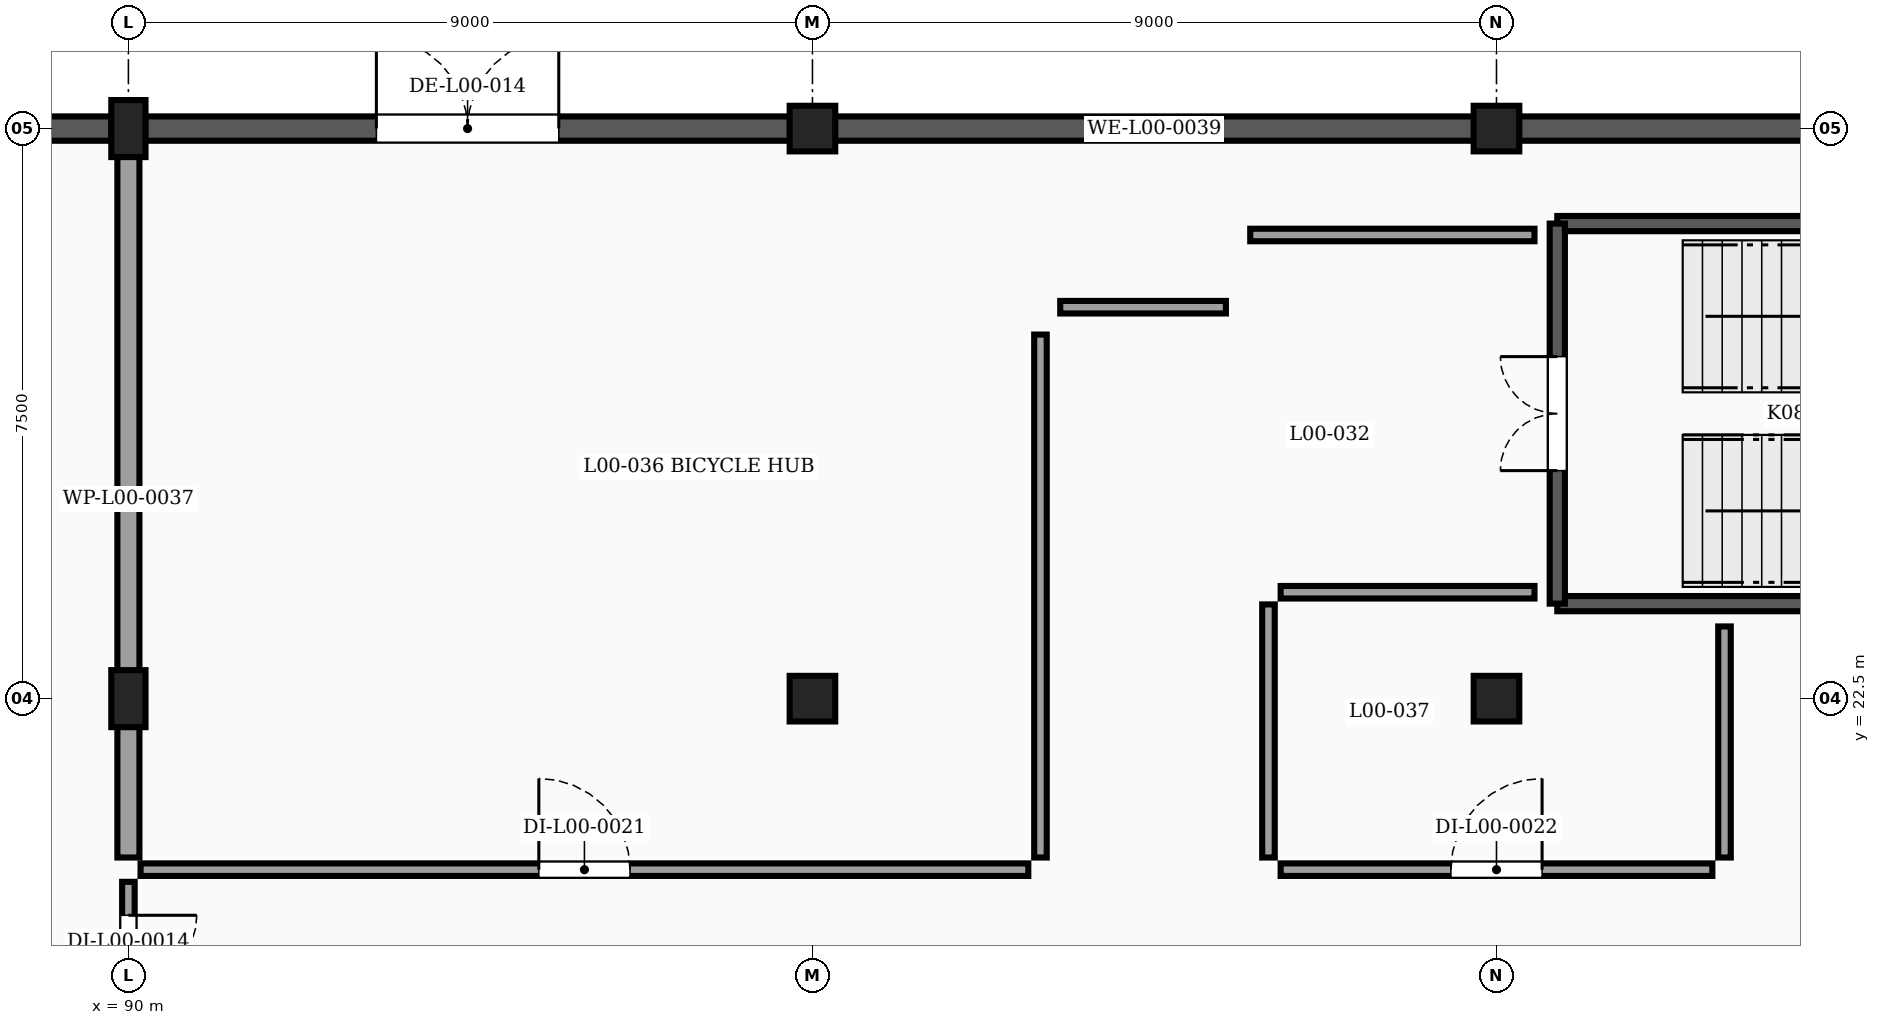
"""IFC4 building model, lengths in metres.
Left out: names, types, materials, properties, quantities, classifications, styles, units other than length and angle.
Written with IfcOpenShell. Run it as: python <this file> out.ifc"""

import sys

from ifc_helpers import new_model, si_unit, direction, frame, frame_2d, origin, origin_2d, place, context, subcontext, project, spatial, rectangle, extrude, element, fill, save


model = new_model("IFC4")
c1 = context("Model", 3, precision=1e-05, world=origin(), true_north=direction((0.0, 1.0)))
c2 = subcontext(c1, "Body", "Model", "MODEL_VIEW")
j1 = project(units=[si_unit("LENGTHUNIT", "METRE"), si_unit("PLANEANGLEUNIT", "RADIAN")], contexts=[c1])
p1 = place(None, origin())
s1 = spatial("IfcSite", under=j1, at=p1, CompositionType="ELEMENT")
p2 = place(p1, origin())
s2 = spatial("IfcBuilding", under=s1, at=p2, CompositionType="ELEMENT")
p3 = place(p2, origin())
s3 = spatial("IfcBuildingStorey", under=s2, at=p3, CompositionType="ELEMENT", Elevation=0.0)
p4 = place(p3, frame((90.0, 22.5, -0.25), z_axis=(0.0, 0.0, 1.0), x_axis=(1.0, 0.0, 0.0)))
e1 = element("IfcColumn", 1, at=p4, inside=s3, PredefinedType="COLUMN", context=c2, shape_type="SweptSolid", body=[
    extrude(rectangle(XDim=0.45, YDim=0.75, at=origin_2d()), origin(), (0.0, 0.0, 1.0), 4.75),
])
for number, where, z_axis, x_axis in (
    (2, (99.0, 22.5, -0.25), (0.0, 0.0, 1.0), (1.0, 0.0, 0.0)),
    (3, (108.0, 22.5, -0.25), (0.0, 0.0, 1.0), (1.0, 0.0, 0.0)),
):
    element("IfcColumn", number, at=place(p3, frame(where, z_axis=z_axis, x_axis=x_axis)), inside=s3, PredefinedType="COLUMN", context=c2, shape_type="SweptSolid", body=[
        extrude(rectangle(XDim=0.6, YDim=0.6, at=origin_2d()), origin(), (0.0, 0.0, 1.0), 4.75),
    ])
p5 = place(p3, frame((90.0, 30.0, -0.25), z_axis=(0.0, 0.0, 1.0), x_axis=(1.0, 0.0, 0.0)))
e4 = element("IfcColumn", 4, at=p5, inside=s3, PredefinedType="COLUMN", context=c2, shape_type="SweptSolid", body=[
    extrude(rectangle(XDim=0.45, YDim=0.75, at=origin_2d()), origin(), (0.0, 0.0, 1.0), 4.75),
])
for number, where, z_axis, x_axis in (
    (5, (99.0, 30.0, -0.25), (0.0, 0.0, 1.0), (1.0, 0.0, 0.0)),
    (6, (108.0, 30.0, -0.25), (0.0, 0.0, 1.0), (1.0, 0.0, 0.0)),
):
    element("IfcColumn", number, at=place(p3, frame(where, z_axis=z_axis, x_axis=x_axis)), inside=s3, PredefinedType="COLUMN", context=c2, shape_type="SweptSolid", body=[
        extrude(rectangle(XDim=0.6, YDim=0.6, at=origin_2d()), origin(), (0.0, 0.0, 1.0), 4.75),
    ])
p6 = place(p3, frame((81.296, 30.0, 0.0), z_axis=(0.0, 0.0, 1.0), x_axis=(1.0, 0.0, 0.0)))
e7 = element("IfcWall", 7, at=p6, inside=s3, PredefinedType="SOLIDWALL", context=c2, shape_type="SweptSolid", body=[
    extrude(rectangle(XDim=8.483, YDim=0.32, at=frame_2d((4.242, 0.0))), origin(), (0.0, 0.0, 1.0), 4.1),
])
p7 = place(p6, frame((3.001, 0.0, 0.95)))
e8 = element("IfcOpeningElement", 8, at=p7, cuts=e7, PredefinedType="OPENING", context=c2, shape_type="SweptSolid", body=[
    extrude(rectangle(XDim=2.48, YDim=1.62, at=frame_2d((1.24, 0.81))), frame((0.0, 0.17, 0.0), z_axis=(0.0, -1.0, 0.0), x_axis=(1.0, 0.0, 0.0)), (0.0, 0.0, 1.0), 0.34),
])
p8 = place(p3, frame((90.221, 30.0, 0.0), z_axis=(0.0, 0.0, 1.0), x_axis=(1.0, 0.0, 0.0)))
e9 = element("IfcWall", 9, at=p8, inside=s3, PredefinedType="SOLIDWALL", context=c2, shape_type="SweptSolid", body=[
    extrude(rectangle(XDim=8.483, YDim=0.32, at=frame_2d((4.242, 0.0))), origin(), (0.0, 0.0, 1.0), 3.442),
])
p9 = place(p8, frame((3.042, 0.0, 0.0)))
e10 = element("IfcOpeningElement", 10, at=p9, cuts=e9, PredefinedType="OPENING", context=c2, shape_type="SweptSolid", body=[
    extrude(rectangle(XDim=2.4, YDim=2.25, at=frame_2d((1.2, 1.125))), frame((0.0, 0.17, 0.0), z_axis=(0.0, -1.0, 0.0), x_axis=(1.0, 0.0, 0.0)), (0.0, 0.0, 1.0), 0.34),
])
for number, where, z_axis, x_axis in (
    (11, (99.296, 30.0, 0.0), (0.0, 0.0, 1.0), (1.0, 0.0, 0.0)),
    (12, (108.296, 30.0, 0.0), (0.0, 0.0, 1.0), (1.0, 0.0, 0.0)),
):
    element("IfcWall", number, at=place(p3, frame(where, z_axis=z_axis, x_axis=x_axis)), inside=s3, PredefinedType="SOLIDWALL", context=c2, shape_type="SweptSolid", body=[
        extrude(rectangle(XDim=8.408, YDim=0.32, at=frame_2d((4.204, 0.0))), origin(), (0.0, 0.0, 1.0), 3.442),
    ])
for number, where, z_axis, x_axis in (
    (13, (108.8, 23.75, 0.0), (0.0, 0.0, 1.0), (1.0, 0.0, 0.0)),
    (14, (116.2, 28.75, 0.0), (0.0, 0.0, 1.0), (-1.0, 0.0, 0.0)),
):
    element("IfcWall", number, at=place(p3, frame(where, z_axis=z_axis, x_axis=x_axis)), inside=s3, PredefinedType="SHEAR", context=c2, shape_type="SweptSolid", body=[
        extrude(rectangle(XDim=7.4, YDim=0.2, at=frame_2d((3.7, 0.0))), origin(), (0.0, 0.0, 1.0), 4.1),
    ])
p10 = place(p3, frame((108.8, 23.75, 0.0), z_axis=(0.0, 0.0, 1.0), x_axis=(0.0, 1.0, 0.0)))
e15 = element("IfcWall", 15, at=p10, inside=s3, PredefinedType="SHEAR", context=c2, shape_type="SweptSolid", body=[
    extrude(rectangle(XDim=5.0, YDim=0.2, at=frame_2d((2.5, 0.0))), origin(), (0.0, 0.0, 1.0), 4.1),
])
p11 = place(p10, frame((1.75, 0.0, 0.0)))
e16 = element("IfcOpeningElement", 16, at=p11, cuts=e15, PredefinedType="OPENING", context=c2, shape_type="SweptSolid", body=[
    extrude(rectangle(XDim=1.5, YDim=2.15, at=frame_2d((0.75, 1.075))), frame((0.0, 0.11, 0.0), z_axis=(0.0, -1.0, 0.0), x_axis=(1.0, 0.0, 0.0)), (0.0, 0.0, 1.0), 0.22),
])
p12 = place(p3, frame((90.0, 20.09, 0.0), z_axis=(0.0, 0.0, 1.0), x_axis=(0.0, -1.0, 0.0)))
e17 = element("IfcWall", 17, at=p12, inside=s3, PredefinedType="PARTITIONING", context=c2, shape_type="SweptSolid", body=[
    extrude(rectangle(XDim=2.68, YDim=0.165, at=frame_2d((1.34, 0.0))), origin(), (0.0, 0.0, 1.0), 3.442),
])
p13 = place(p12, frame((0.44, 0.0, 0.0)))
e18 = element("IfcOpeningElement", 18, at=p13, cuts=e17, PredefinedType="OPENING", context=c2, shape_type="SweptSolid", body=[
    extrude(rectangle(XDim=1.8, YDim=2.25, at=frame_2d((0.9, 1.125))), frame((0.0, 0.093, 0.0), z_axis=(0.0, -1.0, 0.0), x_axis=(1.0, 0.0, 0.0)), (0.0, 0.0, 1.0), 0.185),
])
p14 = place(p3, frame((90.0, 29.84, 0.0), z_axis=(0.0, 0.0, 1.0), x_axis=(0.0, -1.0, 0.0)))
e19 = element("IfcWall", 19, at=p14, inside=s3, PredefinedType="PARTITIONING", context=c2, shape_type="SweptSolid", body=[
    extrude(rectangle(XDim=9.43, YDim=0.29, at=frame_2d((4.715, 0.0))), origin(), (0.0, 0.0, 1.0), 3.442),
])
p15 = place(p3, frame((90.16, 20.25, 0.0), z_axis=(0.0, 0.0, 1.0), x_axis=(1.0, 0.0, 0.0)))
e20 = element("IfcWall", 20, at=p15, inside=s3, PredefinedType="PARTITIONING", context=c2, shape_type="SweptSolid", body=[
    extrude(rectangle(XDim=11.68, YDim=0.165, at=frame_2d((5.84, 0.0))), origin(), (0.0, 0.0, 1.0), 4.1),
])
p16 = place(p15, frame((5.24, 0.0, 0.0)))
e21 = element("IfcOpeningElement", 21, at=p16, cuts=e20, PredefinedType="OPENING", context=c2, shape_type="SweptSolid", body=[
    extrude(rectangle(XDim=1.2, YDim=2.15, at=frame_2d((0.6, 1.075))), frame((0.0, 0.093, 0.0), z_axis=(0.0, -1.0, 0.0), x_axis=(1.0, 0.0, 0.0)), (0.0, 0.0, 1.0), 0.185),
])
p17 = place(p3, frame((102.0, 20.41, 0.0), z_axis=(0.0, 0.0, 1.0), x_axis=(0.0, 1.0, 0.0)))
e22 = element("IfcWall", 22, at=p17, inside=s3, PredefinedType="PARTITIONING", context=c2, shape_type="SweptSolid", body=[
    extrude(rectangle(XDim=6.88, YDim=0.165, at=frame_2d((3.44, 0.0))), origin(), (0.0, 0.0, 1.0), 3.788),
])
p18 = place(p3, frame((102.26, 27.65, 0.0), z_axis=(0.0, 0.0, 1.0), x_axis=(1.0, 0.0, 0.0)))
e23 = element("IfcWall", 23, at=p18, inside=s3, PredefinedType="PARTITIONING", context=c2, shape_type="SweptSolid", body=[
    extrude(rectangle(XDim=2.18, YDim=0.165, at=frame_2d((1.09, 0.0))), origin(), (0.0, 0.0, 1.0), 4.1),
])
p19 = place(p3, frame((104.76, 28.6, 0.0), z_axis=(0.0, 0.0, 1.0), x_axis=(1.0, 0.0, 0.0)))
e24 = element("IfcWall", 24, at=p19, inside=s3, PredefinedType="PARTITIONING", context=c2, shape_type="SweptSolid", body=[
    extrude(rectangle(XDim=3.74, YDim=0.165, at=frame_2d((1.87, 0.0))), origin(), (0.0, 0.0, 1.0), 4.1),
])
p20 = place(p3, frame((108.5, 23.9, 0.0), z_axis=(0.0, 0.0, 1.0), x_axis=(-1.0, 0.0, 0.0)))
e25 = element("IfcWall", 25, at=p20, inside=s3, PredefinedType="PARTITIONING", context=c2, shape_type="SweptSolid", body=[
    extrude(rectangle(XDim=3.34, YDim=0.165, at=frame_2d((1.67, 0.0))), origin(), (0.0, 0.0, 1.0), 4.1),
])
p21 = place(p3, frame((105.0, 23.74, 0.0), z_axis=(0.0, 0.0, 1.0), x_axis=(0.0, -1.0, 0.0)))
e26 = element("IfcWall", 26, at=p21, inside=s3, PredefinedType="PARTITIONING", context=c2, shape_type="SweptSolid", body=[
    extrude(rectangle(XDim=3.33, YDim=0.165, at=frame_2d((1.665, 0.0))), origin(), (0.0, 0.0, 1.0), 3.788),
])
p22 = place(p3, frame((105.16, 20.25, 0.0), z_axis=(0.0, 0.0, 1.0), x_axis=(1.0, 0.0, 0.0)))
e27 = element("IfcWall", 27, at=p22, inside=s3, PredefinedType="PARTITIONING", context=c2, shape_type="SweptSolid", body=[
    extrude(rectangle(XDim=5.68, YDim=0.165, at=frame_2d((2.84, 0.0))), origin(), (0.0, 0.0, 1.0), 4.1),
])
p23 = place(p22, frame((2.24, 0.0, 0.0)))
e28 = element("IfcOpeningElement", 28, at=p23, cuts=e27, PredefinedType="OPENING", context=c2, shape_type="SweptSolid", body=[
    extrude(rectangle(XDim=1.2, YDim=2.15, at=frame_2d((0.6, 1.075))), frame((0.0, 0.093, 0.0), z_axis=(0.0, -1.0, 0.0), x_axis=(1.0, 0.0, 0.0)), (0.0, 0.0, 1.0), 0.185),
])
p24 = place(p3, frame((111.0, 20.41, 0.0), z_axis=(0.0, 0.0, 1.0), x_axis=(0.0, 1.0, 0.0)))
e29 = element("IfcWall", 29, at=p24, inside=s3, PredefinedType="PARTITIONING", context=c2, shape_type="SweptSolid", body=[
    extrude(rectangle(XDim=3.04, YDim=0.165, at=frame_2d((1.52, 0.0))), origin(), (0.0, 0.0, 1.0), 3.788),
])
p25 = place(p9, origin())
e30 = element("IfcDoor", 30, at=p25, inside=s3, OperationType="DOUBLE_DOOR_SINGLE_SWING", PredefinedType="DOOR", context=c2, shape_type="SweptSolid", body=[
    extrude(rectangle(XDim=2.4, YDim=2.25, at=frame_2d((1.2, 1.125))), frame((0.0, 0.025, 0.0), z_axis=(0.0, -1.0, 0.0), x_axis=(1.0, 0.0, 0.0)), (0.0, 0.0, 1.0), 0.05),
])
fill(e10, e30)
p26 = place(p11, origin())
e31 = element("IfcDoor", 31, at=p26, inside=s3, OperationType="DOUBLE_DOOR_SINGLE_SWING", PredefinedType="DOOR", context=c2, shape_type="SweptSolid", body=[
    extrude(rectangle(XDim=1.5, YDim=2.15, at=frame_2d((0.75, 1.075))), frame((0.0, 0.025, 0.0), z_axis=(0.0, -1.0, 0.0), x_axis=(1.0, 0.0, 0.0)), (0.0, 0.0, 1.0), 0.05),
])
fill(e16, e31)
p27 = place(p13, origin())
e32 = element("IfcDoor", 32, at=p27, inside=s3, OperationType="DOUBLE_DOOR_SINGLE_SWING", PredefinedType="DOOR", context=c2, shape_type="SweptSolid", body=[
    extrude(rectangle(XDim=1.8, YDim=2.25, at=frame_2d((0.9, 1.125))), frame((0.0, 0.025, 0.0), z_axis=(0.0, -1.0, 0.0), x_axis=(1.0, 0.0, 0.0)), (0.0, 0.0, 1.0), 0.05),
])
fill(e18, e32)
p28 = place(p16, origin())
e33 = element("IfcDoor", 33, at=p28, inside=s3, OperationType="SINGLE_SWING_LEFT", PredefinedType="DOOR", context=c2, shape_type="SweptSolid", body=[
    extrude(rectangle(XDim=1.2, YDim=2.15, at=frame_2d((0.6, 1.075))), frame((0.0, 0.025, 0.0), z_axis=(0.0, -1.0, 0.0), x_axis=(1.0, 0.0, 0.0)), (0.0, 0.0, 1.0), 0.05),
])
fill(e21, e33)
p29 = place(p23, origin())
e34 = element("IfcDoor", 34, at=p29, inside=s3, OperationType="SINGLE_SWING_RIGHT", PredefinedType="DOOR", context=c2, shape_type="SweptSolid", body=[
    extrude(rectangle(XDim=1.2, YDim=2.15, at=frame_2d((0.6, 1.075))), frame((0.0, 0.025, 0.0), z_axis=(0.0, -1.0, 0.0), x_axis=(1.0, 0.0, 0.0)), (0.0, 0.0, 1.0), 0.05),
])
fill(e28, e34)
save(model, sys.argv[1])
